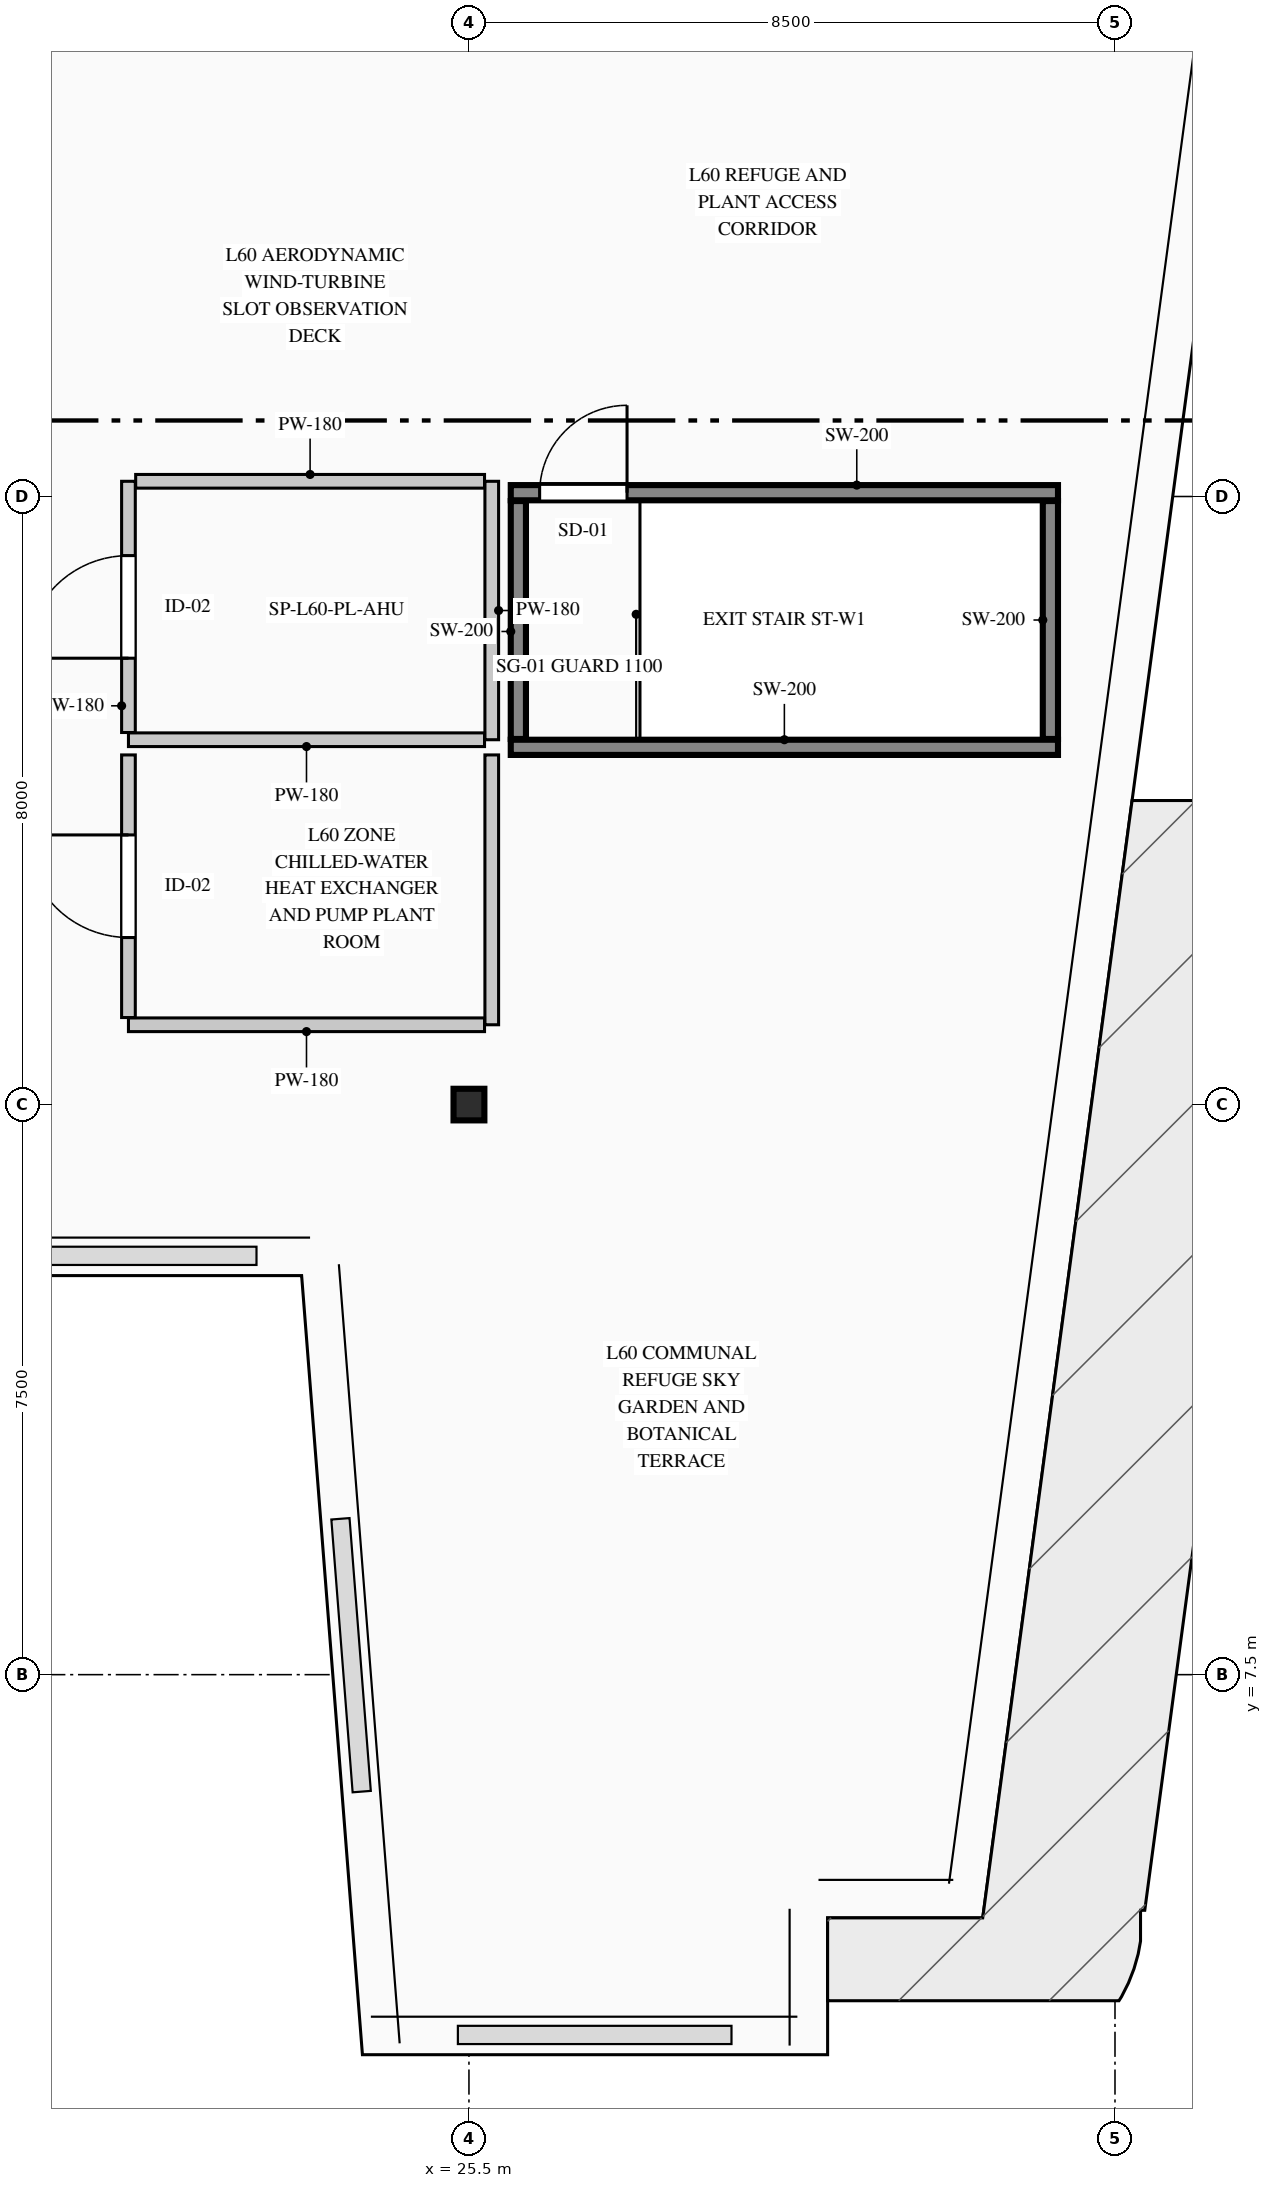
"""IFC4 building model, lengths in metres.
Left out: names, types, materials, properties, quantities, classifications, styles, units other than length and angle.
Written with IfcOpenShell. Run it as: python <this file> out.ifc"""

import sys

from ifc_helpers import new_model, si_unit, direction, frame, frame_2d, origin, origin_2d, place, context, subcontext, project, spatial, rectangle, i_section, extrude, element, fill, save


model = new_model("IFC4")
c1 = context("Model", 3, precision=1e-05, world=origin(), true_north=direction((0.0, 1.0)))
c2 = subcontext(c1, "Body", "Model", "MODEL_VIEW")
j1 = project(units=[si_unit("LENGTHUNIT", "METRE"), si_unit("PLANEANGLEUNIT", "RADIAN")], contexts=[c1])
p1 = place(None, origin())
s1 = spatial("IfcSite", under=j1, at=p1, CompositionType="ELEMENT")
p2 = place(p1, origin())
s2 = spatial("IfcBuilding", under=s1, at=p2, CompositionType="ELEMENT")
p3 = place(p2, frame((0.0, 0.0, 250.9)))
s3 = spatial("IfcBuildingStorey", under=s2, at=p3, CompositionType="ELEMENT", Elevation=250.9)
p4 = place(p3, frame((26.05, 19.7, 0.0), z_axis=(0.0, 0.0, 1.0), x_axis=(1.0, 0.0, 0.0)))
e1 = element("IfcWall", 1, at=p4, inside=s3, PredefinedType="SHEAR", context=c2, shape_type="SweptSolid", body=[
    extrude(rectangle(XDim=7.2, YDim=0.2, at=frame_2d((3.6, 0.0))), origin(), (0.0, 0.0, 1.0), 5.8),
])
p5 = place(p3, frame((26.05, 23.05, 0.0), z_axis=(0.0, 0.0, 1.0), x_axis=(1.0, 0.0, 0.0)))
e2 = element("IfcWall", 2, at=p5, inside=s3, PredefinedType="SHEAR", context=c2, shape_type="SweptSolid", body=[
    extrude(rectangle(XDim=7.2, YDim=0.2, at=frame_2d((3.6, 0.0))), origin(), (0.0, 0.0, 1.0), 5.8),
])
p6 = place(p5, frame((0.38, 0.0, 0.0)))
e3 = element("IfcOpeningElement", 3, at=p6, cuts=e2, PredefinedType="OPENING", context=c2, shape_type="SweptSolid", body=[
    extrude(rectangle(XDim=1.15, YDim=2.2, at=frame_2d((0.575, 1.1))), frame((0.0, 0.11, 0.0), z_axis=(0.0, -1.0, 0.0), x_axis=(1.0, 0.0, 0.0)), (0.0, 0.0, 1.0), 0.22),
])
for number, where, z_axis, x_axis in (
    (4, (26.15, 19.81, 0.0), (0.0, 0.0, 1.0), (0.0, 1.0, 0.0)),
    (5, (33.15, 19.81, 0.0), (0.0, 0.0, 1.0), (0.0, 1.0, 0.0)),
):
    element("IfcWall", number, at=place(p3, frame(where, z_axis=z_axis, x_axis=x_axis)), inside=s3, PredefinedType="SHEAR", context=c2, shape_type="SweptSolid", body=[
        extrude(rectangle(XDim=3.13, YDim=0.2, at=frame_2d((1.565, 0.0))), origin(), (0.0, 0.0, 1.0), 5.8),
    ])
p7 = place(p3, frame((25.5, 15.0, 0.0), z_axis=(0.0, 0.0, 1.0), x_axis=(1.0, 0.0, 0.0)))
e6 = element("IfcColumn", 6, at=p7, inside=s3, PredefinedType="COLUMN", context=c2, shape_type="SweptSolid", body=[
    extrude(i_section(OverallWidth=0.406, OverallDepth=0.416, WebThickness=0.03, FlangeThickness=0.048, FilletRadius=0.015, at=origin_2d()), origin(), (0.0, 0.0, 1.0), 5.8),
])
p8 = place(p3, frame((25.8, 23.2, 0.0), z_axis=(0.0, 0.0, 1.0), x_axis=(0.0, -1.0, 0.0)))
e7 = element("IfcWall", 7, at=p8, inside=s3, PredefinedType="PARTITIONING", context=c2, shape_type="SweptSolid", body=[
    extrude(rectangle(XDim=3.4, YDim=0.18, at=frame_2d((1.7, 0.0))), origin(), (0.0, 0.0, 1.0), 5.55),
])
p9 = place(p3, frame((25.705, 19.8, 0.0), z_axis=(0.0, 0.0, 1.0), x_axis=(-1.0, 0.0, 0.0)))
e8 = element("IfcWall", 8, at=p9, inside=s3, PredefinedType="PARTITIONING", context=c2, shape_type="SweptSolid", body=[
    extrude(rectangle(XDim=4.685, YDim=0.18, at=frame_2d((2.343, 0.0))), origin(), (0.0, 0.0, 1.0), 5.55),
])
p10 = place(p3, frame((21.02, 19.895, 0.0), z_axis=(0.0, 0.0, 1.0), x_axis=(0.0, 1.0, 0.0)))
e9 = element("IfcWall", 9, at=p10, inside=s3, PredefinedType="PARTITIONING", context=c2, shape_type="SweptSolid", body=[
    extrude(rectangle(XDim=3.305, YDim=0.18, at=frame_2d((1.652, 0.0))), origin(), (0.0, 0.0, 1.0), 5.55),
])
p11 = place(p10, frame((0.978, 0.0, 0.0)))
e10 = element("IfcOpeningElement", 10, at=p11, cuts=e9, PredefinedType="OPENING", context=c2, shape_type="SweptSolid", body=[
    extrude(rectangle(XDim=1.35, YDim=2.2, at=frame_2d((0.675, 1.1))), frame((0.0, 0.1, 0.0), z_axis=(0.0, -1.0, 0.0), x_axis=(1.0, 0.0, 0.0)), (0.0, 0.0, 1.0), 0.2),
])
p12 = place(p3, frame((21.115, 23.2, 0.0), z_axis=(0.0, 0.0, 1.0), x_axis=(1.0, 0.0, 0.0)))
e11 = element("IfcWall", 11, at=p12, inside=s3, PredefinedType="PARTITIONING", context=c2, shape_type="SweptSolid", body=[
    extrude(rectangle(XDim=4.59, YDim=0.18, at=frame_2d((2.295, 0.0))), origin(), (0.0, 0.0, 1.0), 5.55),
])
p13 = place(p3, frame((25.8, 19.6, 0.0), z_axis=(0.0, 0.0, 1.0), x_axis=(0.0, -1.0, 0.0)))
e12 = element("IfcWall", 12, at=p13, inside=s3, PredefinedType="PARTITIONING", context=c2, shape_type="SweptSolid", body=[
    extrude(rectangle(XDim=3.55, YDim=0.18, at=frame_2d((1.775, 0.0))), origin(), (0.0, 0.0, 1.0), 5.55),
])
p14 = place(p3, frame((25.705, 16.05, 0.0), z_axis=(0.0, 0.0, 1.0), x_axis=(-1.0, 0.0, 0.0)))
e13 = element("IfcWall", 13, at=p14, inside=s3, PredefinedType="PARTITIONING", context=c2, shape_type="SweptSolid", body=[
    extrude(rectangle(XDim=4.685, YDim=0.18, at=frame_2d((2.343, 0.0))), origin(), (0.0, 0.0, 1.0), 5.55),
])
p15 = place(p3, frame((21.02, 16.145, 0.0), z_axis=(0.0, 0.0, 1.0), x_axis=(0.0, 1.0, 0.0)))
e14 = element("IfcWall", 14, at=p15, inside=s3, PredefinedType="PARTITIONING", context=c2, shape_type="SweptSolid", body=[
    extrude(rectangle(XDim=3.455, YDim=0.18, at=frame_2d((1.728, 0.0))), origin(), (0.0, 0.0, 1.0), 5.55),
])
p16 = place(p15, frame((1.052, 0.0, 0.0)))
e15 = element("IfcOpeningElement", 15, at=p16, cuts=e14, PredefinedType="OPENING", context=c2, shape_type="SweptSolid", body=[
    extrude(rectangle(XDim=1.35, YDim=2.2, at=frame_2d((0.675, 1.1))), frame((0.0, 0.1, 0.0), z_axis=(0.0, -1.0, 0.0), x_axis=(1.0, 0.0, 0.0)), (0.0, 0.0, 1.0), 0.2),
])
p17 = place(p6, origin())
e16 = element("IfcDoor", 16, at=p17, inside=s3, OperationType="SINGLE_SWING_RIGHT", PredefinedType="DOOR", context=c2, shape_type="SweptSolid", body=[
    extrude(rectangle(XDim=1.15, YDim=2.2, at=frame_2d((0.575, 1.1))), frame((0.0, 0.025, 0.0), z_axis=(0.0, -1.0, 0.0), x_axis=(1.0, 0.0, 0.0)), (0.0, 0.0, 1.0), 0.05),
])
fill(e3, e16)
p18 = place(p11, origin())
e17 = element("IfcDoor", 17, at=p18, inside=s3, OperationType="SINGLE_SWING_LEFT", PredefinedType="DOOR", context=c2, shape_type="SweptSolid", body=[
    extrude(rectangle(XDim=1.35, YDim=2.2, at=frame_2d((0.675, 1.1))), frame((0.0, 0.025, 0.0), z_axis=(0.0, -1.0, 0.0), x_axis=(1.0, 0.0, 0.0)), (0.0, 0.0, 1.0), 0.05),
])
fill(e10, e17)
p19 = place(p16, origin())
e18 = element("IfcDoor", 18, at=p19, inside=s3, OperationType="SINGLE_SWING_RIGHT", PredefinedType="DOOR", context=c2, shape_type="SweptSolid", body=[
    extrude(rectangle(XDim=1.35, YDim=2.2, at=frame_2d((0.675, 1.1))), frame((0.0, 0.025, 0.0), z_axis=(0.0, -1.0, 0.0), x_axis=(1.0, 0.0, 0.0)), (0.0, 0.0, 1.0), 0.05),
])
fill(e15, e18)
save(model, sys.argv[1])
